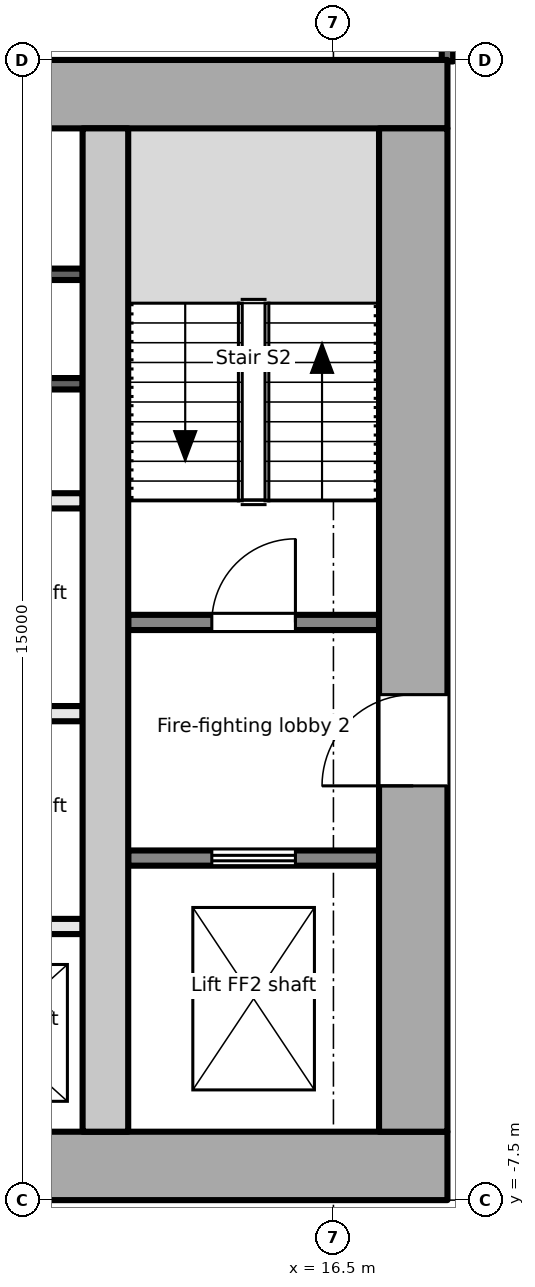
"""IFC4 building model, lengths in metres.
Left out: names, types, materials, properties, quantities, classifications, styles, units other than length and angle.
Written with IfcOpenShell. Run it as: python <this file> out.ifc"""

import sys

from ifc_helpers import new_model, si_unit, direction, frame, frame_2d, origin, place, context, subcontext, project, spatial, rectangle, extrude, element, fill, save


model = new_model("IFC4")
c1 = context("Model", 3, precision=1e-05, world=origin(), true_north=direction((0.0, 1.0)))
c2 = subcontext(c1, "Body", "Model", "MODEL_VIEW")
j1 = project(units=[si_unit("LENGTHUNIT", "METRE"), si_unit("PLANEANGLEUNIT", "RADIAN")], contexts=[c1])
p1 = place(None, origin())
s1 = spatial("IfcSite", under=j1, at=p1, CompositionType="ELEMENT")
p2 = place(p1, origin())
s2 = spatial("IfcBuilding", under=s1, at=p2, CompositionType="ELEMENT")
p3 = place(p2, frame((0.0, 0.0, 57.0)))
s3 = spatial("IfcBuildingStorey", under=s2, at=p3, CompositionType="ELEMENT", Elevation=57.0)
p4 = place(p3, frame((-18.0, -7.05, -0.2), z_axis=(0.0, 0.0, 1.0), x_axis=(1.0, 0.0, 0.0)))
e1 = element("IfcWall", 1, at=p4, inside=s3, PredefinedType="SHEAR", context=c2, shape_type="SweptSolid", body=[
    extrude(rectangle(XDim=36.0, YDim=0.9, at=frame_2d((18.0, 0.0))), origin(), (0.0, 0.0, 1.0), 4.1),
])
p5 = place(p4, frame((7.8, 0.0, 0.2)))
e2 = element("IfcOpeningElement", 2, at=p5, cuts=e1, PredefinedType="OPENING", context=c2, shape_type="SweptSolid", body=[
    extrude(rectangle(XDim=2.4, YDim=2.1, at=frame_2d((1.2, 1.05))), frame((0.0, 0.46, 0.0), z_axis=(0.0, -1.0, 0.0), x_axis=(1.0, 0.0, 0.0)), (0.0, 0.0, 1.0), 0.921),
])
p6 = place(p4, frame((17.4, 0.0, 0.2)))
e3 = element("IfcOpeningElement", 3, at=p6, cuts=e1, PredefinedType="OPENING", context=c2, shape_type="SweptSolid", body=[
    extrude(rectangle(XDim=1.2, YDim=2.1, at=frame_2d((0.6, 1.05))), frame((0.0, 0.46, 0.0), z_axis=(0.0, -1.0, 0.0), x_axis=(1.0, 0.0, 0.0)), (0.0, 0.0, 1.0), 0.921),
])
p7 = place(p4, frame((26.1, 0.0, 0.2)))
e4 = element("IfcOpeningElement", 4, at=p7, cuts=e1, PredefinedType="OPENING", context=c2, shape_type="SweptSolid", body=[
    extrude(rectangle(XDim=2.4, YDim=2.1, at=frame_2d((1.2, 1.05))), frame((0.0, 0.46, 0.0), z_axis=(0.0, -1.0, 0.0), x_axis=(1.0, 0.0, 0.0)), (0.0, 0.0, 1.0), 0.921),
])
p8 = place(p3, frame((-18.0, 7.05, -0.2), z_axis=(0.0, 0.0, 1.0), x_axis=(1.0, 0.0, 0.0)))
e5 = element("IfcWall", 5, at=p8, inside=s3, PredefinedType="SHEAR", context=c2, shape_type="SweptSolid", body=[
    extrude(rectangle(XDim=36.0, YDim=0.9, at=frame_2d((18.0, 0.0))), origin(), (0.0, 0.0, 1.0), 4.1),
])
p9 = place(p3, frame((17.55, -6.6, -0.2), z_axis=(0.0, 0.0, 1.0), x_axis=(0.0, 1.0, 0.0)))
e6 = element("IfcWall", 6, at=p9, inside=s3, PredefinedType="SHEAR", context=c2, shape_type="SweptSolid", body=[
    extrude(rectangle(XDim=13.2, YDim=0.9, at=frame_2d((6.6, 0.0))), origin(), (0.0, 0.0, 1.0), 4.1),
])
p10 = place(p9, frame((4.55, 0.0, 0.2)))
e7 = element("IfcOpeningElement", 7, at=p10, cuts=e6, PredefinedType="OPENING", context=c2, shape_type="SweptSolid", body=[
    extrude(rectangle(XDim=1.2, YDim=2.1, at=frame_2d((0.6, 1.05))), frame((0.0, 0.46, 0.0), z_axis=(0.0, -1.0, 0.0), x_axis=(1.0, 0.0, 0.0)), (0.0, 0.0, 1.0), 0.921),
])
p11 = place(p3, frame((13.5, -6.6, -0.2), z_axis=(0.0, 0.0, 1.0), x_axis=(0.0, 1.0, 0.0)))
e8 = element("IfcWall", 8, at=p11, inside=s3, PredefinedType="SHEAR", context=c2, shape_type="SweptSolid", body=[
    extrude(rectangle(XDim=13.2, YDim=0.6, at=frame_2d((6.6, 0.0))), origin(), (0.0, 0.0, 1.0), 4.1),
])
p12 = place(p3, frame((13.8, -3.0, 0.0), z_axis=(0.0, 0.0, 1.0), x_axis=(1.0, 0.0, 0.0)))
e9 = element("IfcWall", 9, at=p12, inside=s3, PredefinedType="PARTITIONING", context=c2, shape_type="SweptSolid", body=[
    extrude(rectangle(XDim=3.3, YDim=0.2, at=frame_2d((1.65, 0.0))), origin(), (0.0, 0.0, 1.0), 3.9),
])
p13 = place(p12, frame((1.1, 0.0, 0.0)))
e10 = element("IfcOpeningElement", 10, at=p13, cuts=e9, PredefinedType="OPENING", context=c2, shape_type="SweptSolid", body=[
    extrude(rectangle(XDim=1.1, YDim=2.1, at=frame_2d((0.55, 1.05))), frame((0.0, 0.111, 0.0), z_axis=(0.0, -1.0, 0.0), x_axis=(1.0, 0.0, 0.0)), (0.0, 0.0, 1.0), 0.221),
])
p14 = place(p3, frame((13.8, 0.1, 0.0), z_axis=(0.0, 0.0, 1.0), x_axis=(1.0, 0.0, 0.0)))
e11 = element("IfcWall", 11, at=p14, inside=s3, PredefinedType="PARTITIONING", context=c2, shape_type="SweptSolid", body=[
    extrude(rectangle(XDim=3.3, YDim=0.2, at=frame_2d((1.65, 0.0))), origin(), (0.0, 0.0, 1.0), 3.9),
])
p15 = place(p14, frame((1.1, 0.0, 0.0)))
e12 = element("IfcOpeningElement", 12, at=p15, cuts=e11, PredefinedType="OPENING", context=c2, shape_type="SweptSolid", body=[
    extrude(rectangle(XDim=1.1, YDim=2.1, at=frame_2d((0.55, 1.05))), frame((0.0, 0.111, 0.0), z_axis=(0.0, -1.0, 0.0), x_axis=(1.0, 0.0, 0.0)), (0.0, 0.0, 1.0), 0.221),
])
for number, where, z_axis, x_axis in (
    (13, (10.9, -3.9, 0.0), (0.0, 0.0, 1.0), (1.0, 0.0, 0.0)),
    (14, (10.9, -1.1, 0.0), (0.0, 0.0, 1.0), (1.0, 0.0, 0.0)),
    (15, (10.9, 1.7, 0.0), (0.0, 0.0, 1.0), (1.0, 0.0, 0.0)),
):
    element("IfcWall", number, at=place(p3, frame(where, z_axis=z_axis, x_axis=x_axis)), inside=s3, PredefinedType="PARTITIONING", context=c2, shape_type="SweptSolid", body=[
        extrude(rectangle(XDim=2.3, YDim=0.2, at=frame_2d((1.15, 0.0))), origin(), (0.0, 0.0, 1.0), 3.9),
    ])
for number, where, z_axis, x_axis in (
    (16, (10.9, 3.24, 0.0), (0.0, 0.0, 1.0), (1.0, 0.0, 0.0)),
    (17, (10.9, 4.68, 0.0), (0.0, 0.0, 1.0), (1.0, 0.0, 0.0)),
):
    element("IfcWall", number, at=place(p3, frame(where, z_axis=z_axis, x_axis=x_axis)), inside=s3, PredefinedType="PARTITIONING", context=c2, shape_type="SweptSolid", body=[
        extrude(rectangle(XDim=2.3, YDim=0.15, at=frame_2d((1.15, 0.0))), origin(), (0.0, 0.0, 1.0), 3.9),
    ])
p16 = place(p3, frame((18.0, 7.48, 0.0), z_axis=(0.0, 0.0, 1.0), x_axis=(0.0, 1.0, 0.0)))
e18 = element("IfcWall", 18, at=p16, inside=s3, PredefinedType="PARTITIONING", context=c2, shape_type="SweptSolid", body=[
    extrude(rectangle(XDim=2.26, YDim=0.15, at=frame_2d((1.13, 0.0))), origin(), (0.0, 0.0, 1.0), 2.9),
])
p17 = place(p13, origin())
e19 = element("IfcDoor", 19, at=p17, inside=s3, OperationType="DOUBLE_DOOR_SLIDING", PredefinedType="DOOR", context=c2, shape_type="SweptSolid", body=[
    extrude(rectangle(XDim=1.1, YDim=2.1, at=frame_2d((0.55, 1.05))), frame((0.0, 0.025, 0.0), z_axis=(0.0, -1.0, 0.0), x_axis=(1.0, 0.0, 0.0)), (0.0, 0.0, 1.0), 0.05),
])
fill(e10, e19)
p18 = place(p10, origin())
e20 = element("IfcDoor", 20, at=p18, inside=s3, OperationType="SINGLE_SWING_LEFT", PredefinedType="DOOR", context=c2, shape_type="SweptSolid", body=[
    extrude(rectangle(XDim=1.2, YDim=2.1, at=frame_2d((0.6, 1.05))), frame((0.0, 0.025, 0.0), z_axis=(0.0, -1.0, 0.0), x_axis=(1.0, 0.0, 0.0)), (0.0, 0.0, 1.0), 0.05),
])
fill(e7, e20)
p19 = place(p15, origin())
e21 = element("IfcDoor", 21, at=p19, inside=s3, OperationType="SINGLE_SWING_RIGHT", PredefinedType="DOOR", context=c2, shape_type="SweptSolid", body=[
    extrude(rectangle(XDim=1.1, YDim=2.1, at=frame_2d((0.55, 1.05))), frame((0.0, 0.025, 0.0), z_axis=(0.0, -1.0, 0.0), x_axis=(1.0, 0.0, 0.0)), (0.0, 0.0, 1.0), 0.05),
])
fill(e12, e21)
save(model, sys.argv[1])
